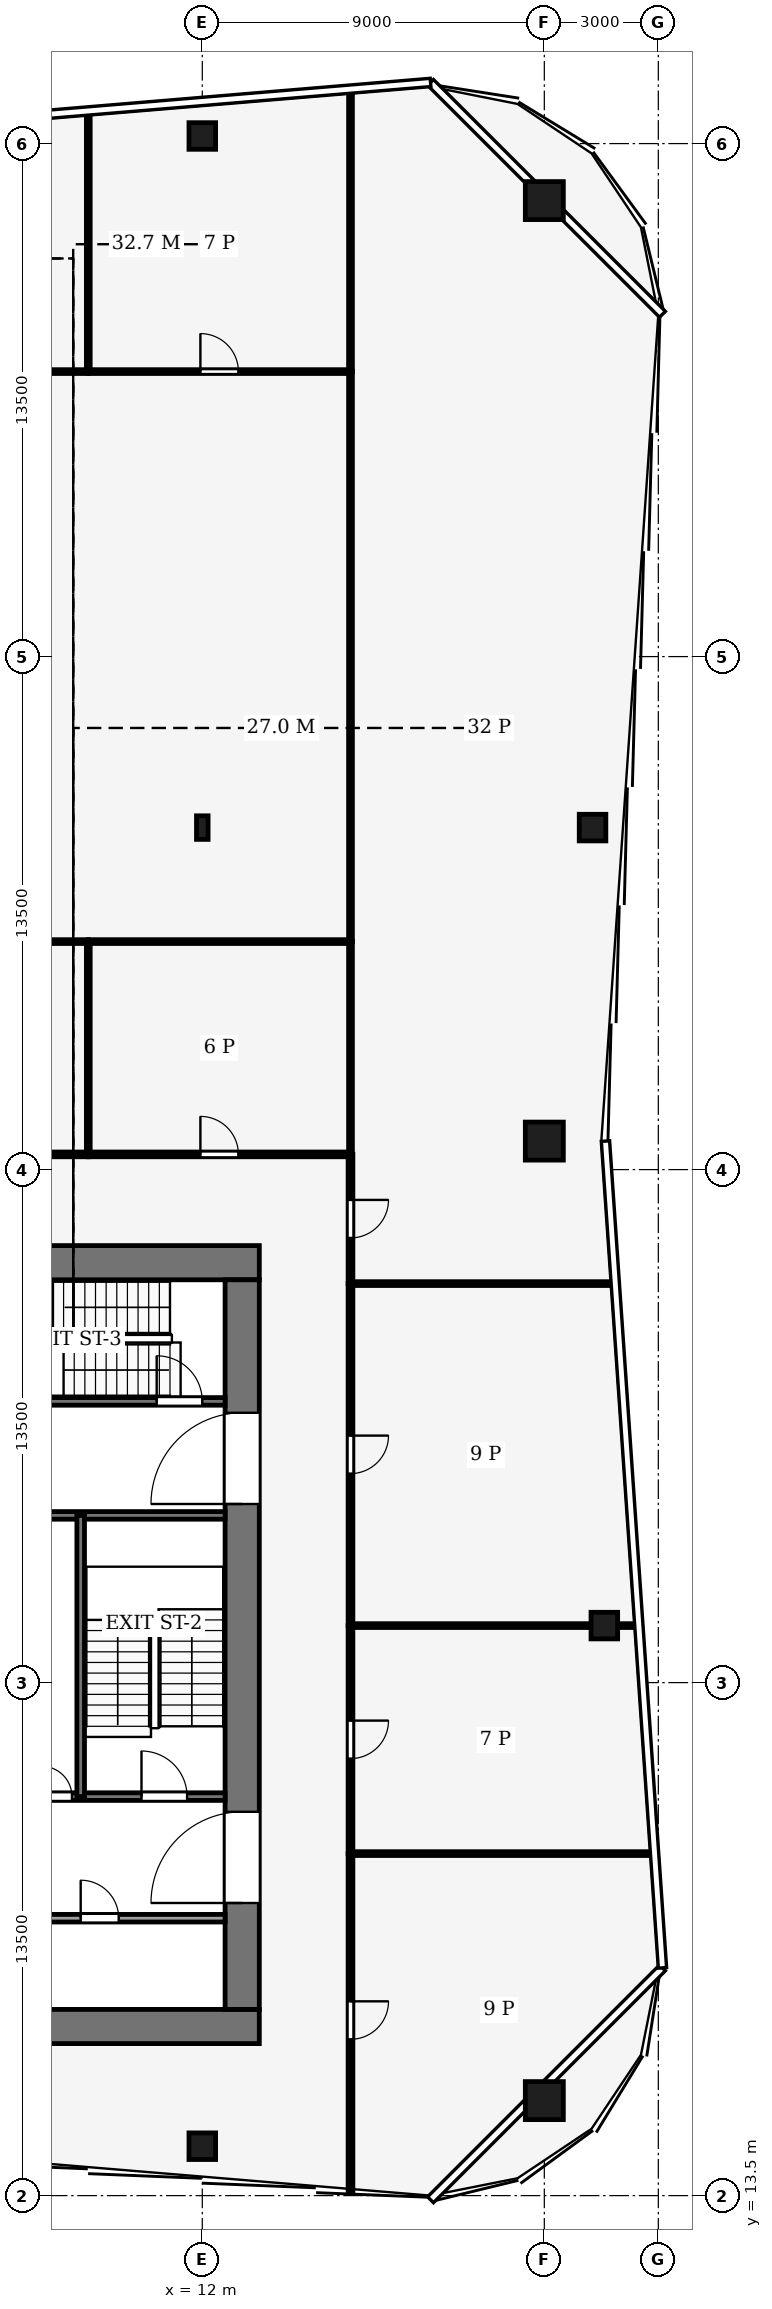
"""IFC4 building model, lengths in metres.
Left out: names, types, materials, properties, quantities, classifications, styles, units other than length and angle.
Written with IfcOpenShell. Run it as: python <this file> out.ifc"""

import sys

from ifc_helpers import new_model, si_unit, direction, frame, frame_2d, origin, origin_2d, place, context, subcontext, project, spatial, rectangle, hollow_rectangle, i_section, extrude, element, fill, save


model = new_model("IFC4")
c1 = context("Model", 3, precision=1e-05, world=origin(), true_north=direction((0.0, 1.0)))
c2 = subcontext(c1, "Body", "Model", "MODEL_VIEW")
j1 = project(units=[si_unit("LENGTHUNIT", "METRE"), si_unit("PLANEANGLEUNIT", "RADIAN")], contexts=[c1])
p1 = place(None, origin())
s1 = spatial("IfcSite", under=j1, at=p1, CompositionType="ELEMENT")
p2 = place(p1, origin())
s2 = spatial("IfcBuilding", under=s1, at=p2, CompositionType="ELEMENT")
p3 = place(p2, frame((0.0, 0.0, 202.0)))
s3 = spatial("IfcBuildingStorey", under=s2, at=p3, CompositionType="ELEMENT", Elevation=202.0)
for number, where, z_axis, x_axis in (
    (1, (-13.5, 17.95, -0.13), (0.0, 0.0, 1.0), (1.0, 0.0, 0.0)),
    (2, (-13.5, 38.05, -0.13), (0.0, 0.0, 1.0), (1.0, 0.0, 0.0)),
):
    element("IfcWall", number, at=place(p3, frame(where, z_axis=z_axis, x_axis=x_axis)), inside=s3, PredefinedType="SHEAR", context=c2, shape_type="SweptSolid", body=[
        extrude(rectangle(XDim=27.0, YDim=0.9, at=frame_2d((13.5, 0.0))), origin(), (0.0, 0.0, 1.0), 4.0),
    ])
p4 = place(p3, frame((13.05, 18.4, -0.13), z_axis=(0.0, 0.0, 1.0), x_axis=(0.0, 1.0, 0.0)))
e3 = element("IfcWall", 3, at=p4, inside=s3, PredefinedType="SHEAR", context=c2, shape_type="SweptSolid", body=[
    extrude(rectangle(XDim=19.2, YDim=0.9, at=frame_2d((9.6, 0.0))), origin(), (0.0, 0.0, 1.0), 4.0),
])
p5 = place(p4, frame((2.8, 0.0, 0.13)))
e4 = element("IfcOpeningElement", 4, at=p5, cuts=e3, PredefinedType="OPENING", context=c2, shape_type="SweptSolid", body=[
    extrude(rectangle(XDim=2.4, YDim=2.4, at=frame_2d((1.2, 1.2))), frame((0.0, 0.46, 0.0), z_axis=(0.0, -1.0, 0.0), x_axis=(1.0, 0.0, 0.0)), (0.0, 0.0, 1.0), 0.92),
])
p6 = place(p4, frame((13.3, 0.0, 0.13)))
e5 = element("IfcOpeningElement", 5, at=p6, cuts=e3, PredefinedType="OPENING", context=c2, shape_type="SweptSolid", body=[
    extrude(rectangle(XDim=2.4, YDim=2.4, at=frame_2d((1.2, 1.2))), frame((0.0, 0.46, 0.0), z_axis=(0.0, -1.0, 0.0), x_axis=(1.0, 0.0, 0.0)), (0.0, 0.0, 1.0), 0.92),
])
for number, where, z_axis, x_axis in (
    (6, (21.0, 66.0, 0.0), (0.0, 0.0, 1.0), (1.0, 0.0, 0.0)),
    (7, (21.0, 41.25, 0.0), (0.0, 0.0, 1.0), (1.0, 0.0, 0.0)),
    (8, (21.0, 16.0, 0.0), (0.0, 0.0, 1.0), (1.0, 0.0, 0.0)),
):
    element("IfcColumn", number, at=place(p3, frame(where, z_axis=z_axis, x_axis=x_axis)), inside=s3, PredefinedType="COLUMN", context=c2, shape_type="SweptSolid", body=[
        extrude(hollow_rectangle(XDim=1.0, YDim=1.0, WallThickness=0.06, at=origin_2d()), origin(), (0.0, 0.0, 1.0), 4.0),
    ])
for number, where, z_axis, x_axis in (
    (9, (12.0, 67.7, 0.0), (0.0, 0.0, 1.0), (1.0, 0.0, 0.0)),
    (10, (12.0, 14.8, 0.0), (0.0, 0.0, 1.0), (1.0, 0.0, 0.0)),
    (11, (22.579, 28.5, 0.0), (0.0, 0.0, 1.0), (1.0, 0.0, 0.0)),
    (12, (22.269, 49.5, 0.0), (0.0, 0.0, 1.0), (1.0, 0.0, 0.0)),
):
    element("IfcColumn", number, at=place(p3, frame(where, z_axis=z_axis, x_axis=x_axis)), inside=s3, PredefinedType="COLUMN", context=c2, shape_type="SweptSolid", body=[
        extrude(hollow_rectangle(XDim=0.7, YDim=0.7, WallThickness=0.03, at=origin_2d()), origin(), (0.0, 0.0, 1.0), 4.0),
    ])
p7 = place(p3, frame((12.0, 49.5, 0.0), z_axis=(0.0, 0.0, 1.0), x_axis=(1.0, 0.0, 0.0)))
e13 = element("IfcColumn", 13, at=p7, inside=s3, PredefinedType="COLUMN", context=c2, shape_type="SweptSolid", body=[
    extrude(i_section(OverallWidth=0.305, OverallDepth=0.62, WebThickness=0.021, FlangeThickness=0.04, FilletRadius=0.027, at=origin_2d()), origin(), (0.0, 0.0, 1.0), 4.0),
])
p8 = place(p3, frame((6.0, 20.8, 0.0), z_axis=(0.0, 0.0, 1.0), x_axis=(1.0, 0.0, 0.0)))
e14 = element("IfcWall", 14, at=p8, inside=s3, PredefinedType="PARTITIONING", context=c2, shape_type="SweptSolid", body=[
    extrude(rectangle(XDim=6.6, YDim=0.2, at=frame_2d((3.3, 0.0))), origin(), (0.0, 0.0, 1.0), 3.87),
])
p9 = place(p8, frame((2.8, 0.0, 0.0)))
e15 = element("IfcOpeningElement", 15, at=p9, cuts=e14, PredefinedType="OPENING", context=c2, shape_type="SweptSolid", body=[
    extrude(rectangle(XDim=1.0, YDim=2.1, at=frame_2d((0.5, 1.05))), frame((0.0, 0.11, 0.0), z_axis=(0.0, -1.0, 0.0), x_axis=(1.0, 0.0, 0.0)), (0.0, 0.0, 1.0), 0.22),
])
p10 = place(p3, frame((6.0, 24.0, 0.0), z_axis=(0.0, 0.0, 1.0), x_axis=(1.0, 0.0, 0.0)))
e16 = element("IfcWall", 16, at=p10, inside=s3, PredefinedType="PARTITIONING", context=c2, shape_type="SweptSolid", body=[
    extrude(rectangle(XDim=6.6, YDim=0.2, at=frame_2d((3.3, 0.0))), origin(), (0.0, 0.0, 1.0), 3.87),
])
p11 = place(p10, frame((0.27, 0.0, 0.0)))
e17 = element("IfcOpeningElement", 17, at=p11, cuts=e16, PredefinedType="OPENING", context=c2, shape_type="SweptSolid", body=[
    extrude(rectangle(XDim=1.0, YDim=2.1, at=frame_2d((0.5, 1.05))), frame((0.0, 0.11, 0.0), z_axis=(0.0, -1.0, 0.0), x_axis=(1.0, 0.0, 0.0)), (0.0, 0.0, 1.0), 0.22),
])
p12 = place(p10, frame((1.77, 0.0, 0.0)))
e18 = element("IfcOpeningElement", 18, at=p12, cuts=e16, PredefinedType="OPENING", context=c2, shape_type="SweptSolid", body=[
    extrude(rectangle(XDim=0.8, YDim=2.1, at=frame_2d((0.4, 1.05))), frame((0.0, 0.11, 0.0), z_axis=(0.0, -1.0, 0.0), x_axis=(1.0, 0.0, 0.0)), (0.0, 0.0, 1.0), 0.22),
])
p13 = place(p10, frame((4.4, 0.0, 0.0)))
e19 = element("IfcOpeningElement", 19, at=p13, cuts=e16, PredefinedType="OPENING", context=c2, shape_type="SweptSolid", body=[
    extrude(rectangle(XDim=1.2, YDim=2.2, at=frame_2d((0.6, 1.1))), frame((0.0, 0.11, 0.0), z_axis=(0.0, -1.0, 0.0), x_axis=(1.0, 0.0, 0.0)), (0.0, 0.0, 1.0), 0.22),
])
p14 = place(p3, frame((6.0, 31.4, 0.0), z_axis=(0.0, 0.0, 1.0), x_axis=(1.0, 0.0, 0.0)))
e20 = element("IfcWall", 20, at=p14, inside=s3, PredefinedType="PARTITIONING", context=c2, shape_type="SweptSolid", body=[
    extrude(rectangle(XDim=6.6, YDim=0.2, at=frame_2d((3.3, 0.0))), origin(), (0.0, 0.0, 1.0), 3.87),
])
p15 = place(p3, frame((6.0, 34.4, 0.0), z_axis=(0.0, 0.0, 1.0), x_axis=(1.0, 0.0, 0.0)))
e21 = element("IfcWall", 21, at=p15, inside=s3, PredefinedType="PARTITIONING", context=c2, shape_type="SweptSolid", body=[
    extrude(rectangle(XDim=6.6, YDim=0.2, at=frame_2d((3.3, 0.0))), origin(), (0.0, 0.0, 1.0), 3.87),
])
p16 = place(p15, frame((4.8, 0.0, 0.0)))
e22 = element("IfcOpeningElement", 22, at=p16, cuts=e21, PredefinedType="OPENING", context=c2, shape_type="SweptSolid", body=[
    extrude(rectangle(XDim=1.2, YDim=2.2, at=frame_2d((0.6, 1.1))), frame((0.0, 0.11, 0.0), z_axis=(0.0, -1.0, 0.0), x_axis=(1.0, 0.0, 0.0)), (0.0, 0.0, 1.0), 0.22),
])
p17 = place(p3, frame((8.8, 24.0, 0.0), z_axis=(0.0, 0.0, 1.0), x_axis=(0.0, 1.0, 0.0)))
e23 = element("IfcWall", 23, at=p17, inside=s3, PredefinedType="PARTITIONING", context=c2, shape_type="SweptSolid", body=[
    extrude(rectangle(XDim=7.4, YDim=0.2, at=frame_2d((3.7, 0.0))), origin(), (0.0, 0.0, 1.0), 3.87),
])
p18 = place(p3, frame((3.0, 40.9, 0.0), z_axis=(0.0, 0.0, 1.0), x_axis=(1.0, 0.0, 0.0)))
e24 = element("IfcWall", 24, at=p18, inside=s3, PredefinedType="PARTITIONING", context=c2, shape_type="SweptSolid", body=[
    extrude(rectangle(XDim=6.0, YDim=0.125, at=frame_2d((3.0, 0.0))), origin(), (0.0, 0.0, 1.0), 3.44),
])
p19 = place(p18, frame((2.5, 0.0, 0.0)))
e25 = element("IfcOpeningElement", 25, at=p19, cuts=e24, PredefinedType="OPENING", context=c2, shape_type="SweptSolid", body=[
    extrude(rectangle(XDim=1.0, YDim=2.1, at=frame_2d((0.5, 1.05))), frame((0.0, 0.073, 0.0), z_axis=(0.0, -1.0, 0.0), x_axis=(1.0, 0.0, 0.0)), (0.0, 0.0, 1.0), 0.145),
])
p20 = place(p3, frame((9.0, 40.9, 0.0), z_axis=(0.0, 0.0, 1.0), x_axis=(1.0, 0.0, 0.0)))
e26 = element("IfcWall", 26, at=p20, inside=s3, PredefinedType="PARTITIONING", context=c2, shape_type="SweptSolid", body=[
    extrude(rectangle(XDim=6.9, YDim=0.125, at=frame_2d((3.45, 0.0))), origin(), (0.0, 0.0, 1.0), 3.44),
])
p21 = place(p20, frame((2.95, 0.0, 0.0)))
e27 = element("IfcOpeningElement", 27, at=p21, cuts=e26, PredefinedType="OPENING", context=c2, shape_type="SweptSolid", body=[
    extrude(rectangle(XDim=1.0, YDim=2.1, at=frame_2d((0.5, 1.05))), frame((0.0, 0.073, 0.0), z_axis=(0.0, -1.0, 0.0), x_axis=(1.0, 0.0, 0.0)), (0.0, 0.0, 1.0), 0.145),
])
p22 = place(p3, frame((15.9, 22.5, 0.0), z_axis=(0.0, 0.0, 1.0), x_axis=(0.0, -1.0, 0.0)))
e28 = element("IfcWall", 28, at=p22, inside=s3, PredefinedType="PARTITIONING", context=c2, shape_type="SweptSolid", body=[
    extrude(rectangle(XDim=8.905, YDim=0.125, at=frame_2d((4.453, 0.0))), origin(), (0.0, 0.0, 1.0), 3.04),
])
p23 = place(p22, frame((3.887, 0.0, 0.0)))
e29 = element("IfcOpeningElement", 29, at=p23, cuts=e28, PredefinedType="OPENING", context=c2, shape_type="SweptSolid", body=[
    extrude(rectangle(XDim=1.0, YDim=2.1, at=frame_2d((0.5, 1.05))), frame((0.0, 0.073, 0.0), z_axis=(0.0, -1.0, 0.0), x_axis=(1.0, 0.0, 0.0)), (0.0, 0.0, 1.0), 0.145),
])
p24 = place(p3, frame((15.9, 28.5, 0.0), z_axis=(0.0, 0.0, 1.0), x_axis=(0.0, -1.0, 0.0)))
e30 = element("IfcWall", 30, at=p24, inside=s3, PredefinedType="PARTITIONING", context=c2, shape_type="SweptSolid", body=[
    extrude(rectangle(XDim=6.0, YDim=0.125, at=frame_2d((3.0, 0.0))), origin(), (0.0, 0.0, 1.0), 3.44),
])
p25 = place(p24, frame((2.5, 0.0, 0.0)))
e31 = element("IfcOpeningElement", 31, at=p25, cuts=e30, PredefinedType="OPENING", context=c2, shape_type="SweptSolid", body=[
    extrude(rectangle(XDim=1.0, YDim=2.1, at=frame_2d((0.5, 1.05))), frame((0.0, 0.073, 0.0), z_axis=(0.0, -1.0, 0.0), x_axis=(1.0, 0.0, 0.0)), (0.0, 0.0, 1.0), 0.145),
])
p26 = place(p3, frame((15.9, 37.5, 0.0), z_axis=(0.0, 0.0, 1.0), x_axis=(0.0, -1.0, 0.0)))
e32 = element("IfcWall", 32, at=p26, inside=s3, PredefinedType="PARTITIONING", context=c2, shape_type="SweptSolid", body=[
    extrude(rectangle(XDim=9.0, YDim=0.125, at=frame_2d((4.5, 0.0))), origin(), (0.0, 0.0, 1.0), 3.48),
])
p27 = place(p26, frame((4.0, 0.0, 0.0)))
e33 = element("IfcOpeningElement", 33, at=p27, cuts=e32, PredefinedType="OPENING", context=c2, shape_type="SweptSolid", body=[
    extrude(rectangle(XDim=1.0, YDim=2.1, at=frame_2d((0.5, 1.05))), frame((0.0, 0.073, 0.0), z_axis=(0.0, -1.0, 0.0), x_axis=(1.0, 0.0, 0.0)), (0.0, 0.0, 1.0), 0.145),
])
p28 = place(p3, frame((15.9, 40.904, 0.0), z_axis=(0.0, 0.0, 1.0), x_axis=(0.0, -1.0, 0.0)))
e34 = element("IfcWall", 34, at=p28, inside=s3, PredefinedType="PARTITIONING", context=c2, shape_type="SweptSolid", body=[
    extrude(rectangle(XDim=3.404, YDim=0.125, at=frame_2d((1.702, 0.0))), origin(), (0.0, 0.0, 1.0), 3.14),
])
p29 = place(p28, frame((1.202, 0.0, 0.0)))
e35 = element("IfcOpeningElement", 35, at=p29, cuts=e34, PredefinedType="OPENING", context=c2, shape_type="SweptSolid", body=[
    extrude(rectangle(XDim=1.0, YDim=2.1, at=frame_2d((0.5, 1.05))), frame((0.0, 0.073, 0.0), z_axis=(0.0, -1.0, 0.0), x_axis=(1.0, 0.0, 0.0)), (0.0, 0.0, 1.0), 0.145),
])
p30 = place(p3, frame((9.0, 40.9, 0.0), z_axis=(0.0, 0.0, 1.0), x_axis=(0.0, 1.0, 0.0)))
e36 = element("IfcWall", 36, at=p30, inside=s3, PredefinedType="PARTITIONING", context=c2, shape_type="SweptSolid", body=[
    extrude(rectangle(XDim=5.6, YDim=0.1, at=frame_2d((2.8, 0.0))), origin(), (0.0, 0.0, 1.0), 3.87),
])
p31 = place(p3, frame((9.004, 46.5, 0.0), z_axis=(0.0, 0.0, 1.0), x_axis=(-1.0, 0.0, 0.0)))
e37 = element("IfcWall", 37, at=p31, inside=s3, PredefinedType="PARTITIONING", context=c2, shape_type="SweptSolid", body=[
    extrude(rectangle(XDim=6.008, YDim=0.1, at=frame_2d((3.004, 0.0))), origin(), (0.0, 0.0, 1.0), 3.44),
])
p32 = place(p3, frame((15.9, 46.5, 0.0), z_axis=(0.0, 0.0, 1.0), x_axis=(-1.0, 0.0, 0.0)))
e38 = element("IfcWall", 38, at=p32, inside=s3, PredefinedType="PARTITIONING", context=c2, shape_type="SweptSolid", body=[
    extrude(rectangle(XDim=6.904, YDim=0.1, at=frame_2d((3.452, 0.0))), origin(), (0.0, 0.0, 1.0), 3.44),
])
p33 = place(p3, frame((15.9, 40.896, 0.0), z_axis=(0.0, 0.0, 1.0), x_axis=(0.0, 1.0, 0.0)))
e39 = element("IfcWall", 39, at=p33, inside=s3, PredefinedType="PARTITIONING", context=c2, shape_type="SweptSolid", body=[
    extrude(rectangle(XDim=5.608, YDim=0.1, at=frame_2d((2.804, 0.0))), origin(), (0.0, 0.0, 1.0), 3.44),
])
p34 = place(p3, frame((0.0, 61.5, 0.0), z_axis=(0.0, 0.0, 1.0), x_axis=(1.0, 0.0, 0.0)))
e40 = element("IfcWall", 40, at=p34, inside=s3, PredefinedType="PARTITIONING", context=c2, shape_type="SweptSolid", body=[
    extrude(rectangle(XDim=9.0, YDim=0.1, at=frame_2d((4.5, 0.0))), origin(), (0.0, 0.0, 1.0), 3.24),
])
p35 = place(p34, frame((4.0, 0.0, 0.0)))
e41 = element("IfcOpeningElement", 41, at=p35, cuts=e40, PredefinedType="OPENING", context=c2, shape_type="SweptSolid", body=[
    extrude(rectangle(XDim=1.0, YDim=2.1, at=frame_2d((0.5, 1.05))), frame((0.0, 0.06, 0.0), z_axis=(0.0, -1.0, 0.0), x_axis=(1.0, 0.0, 0.0)), (0.0, 0.0, 1.0), 0.12),
])
p36 = place(p3, frame((9.0, 61.5, 0.0), z_axis=(0.0, 0.0, 1.0), x_axis=(1.0, 0.0, 0.0)))
e42 = element("IfcWall", 42, at=p36, inside=s3, PredefinedType="PARTITIONING", context=c2, shape_type="SweptSolid", body=[
    extrude(rectangle(XDim=6.9, YDim=0.1, at=frame_2d((3.45, 0.0))), origin(), (0.0, 0.0, 1.0), 3.24),
])
p37 = place(p36, frame((2.95, 0.0, 0.0)))
e43 = element("IfcOpeningElement", 43, at=p37, cuts=e42, PredefinedType="OPENING", context=c2, shape_type="SweptSolid", body=[
    extrude(rectangle(XDim=1.0, YDim=2.1, at=frame_2d((0.5, 1.05))), frame((0.0, 0.06, 0.0), z_axis=(0.0, -1.0, 0.0), x_axis=(1.0, 0.0, 0.0)), (0.0, 0.0, 1.0), 0.12),
])
p38 = place(p3, frame((15.9, 46.496, 0.0), z_axis=(0.0, 0.0, 1.0), x_axis=(0.0, 1.0, 0.0)))
e44 = element("IfcWall", 44, at=p38, inside=s3, PredefinedType="PARTITIONING", context=c2, shape_type="SweptSolid", body=[
    extrude(rectangle(XDim=15.008, YDim=0.1, at=frame_2d((7.504, 0.0))), origin(), (0.0, 0.0, 1.0), 3.24),
])
p39 = place(p3, frame((9.0, 61.5, 0.0), z_axis=(0.0, 0.0, 1.0), x_axis=(0.0, 1.0, 0.0)))
e45 = element("IfcWall", 45, at=p39, inside=s3, PredefinedType="PARTITIONING", context=c2, shape_type="SweptSolid", body=[
    extrude(rectangle(XDim=6.83, YDim=0.1, at=frame_2d((3.415, 0.0))), origin(), (0.0, 0.0, 1.0), 3.04),
])
p40 = place(p3, frame((15.9, 61.496, 0.0), z_axis=(0.0, 0.0, 1.0), x_axis=(0.0, 1.0, 0.0)))
e46 = element("IfcWall", 46, at=p40, inside=s3, PredefinedType="PARTITIONING", context=c2, shape_type="SweptSolid", body=[
    extrude(rectangle(XDim=7.409, YDim=0.1, at=frame_2d((3.705, 0.0))), origin(), (0.0, 0.0, 1.0), 3.04),
])
p41 = place(p3, frame((23.873, 22.5, 0.0), z_axis=(0.0, 0.0, 1.0), x_axis=(-1.0, 0.0, 0.0)))
e47 = element("IfcWall", 47, at=p41, inside=s3, PredefinedType="PARTITIONING", context=c2, shape_type="SweptSolid", body=[
    extrude(rectangle(XDim=7.973, YDim=0.1, at=frame_2d((3.987, 0.0))), origin(), (0.0, 0.0, 1.0), 3.04),
])
p42 = place(p3, frame((23.459, 28.5, 0.0), z_axis=(0.0, 0.0, 1.0), x_axis=(-1.0, 0.0, 0.0)))
e48 = element("IfcWall", 48, at=p42, inside=s3, PredefinedType="PARTITIONING", context=c2, shape_type="SweptSolid", body=[
    extrude(rectangle(XDim=7.559, YDim=0.1, at=frame_2d((3.78, 0.0))), origin(), (0.0, 0.0, 1.0), 3.04),
])
p43 = place(p3, frame((22.839, 37.5, 0.0), z_axis=(0.0, 0.0, 1.0), x_axis=(-1.0, 0.0, 0.0)))
e49 = element("IfcWall", 49, at=p43, inside=s3, PredefinedType="PARTITIONING", context=c2, shape_type="SweptSolid", body=[
    extrude(rectangle(XDim=6.939, YDim=0.1, at=frame_2d((3.469, 0.0))), origin(), (0.0, 0.0, 1.0), 3.04),
])
p44 = place(p9, origin())
e50 = element("IfcDoor", 50, at=p44, inside=s3, OperationType="SINGLE_SWING_RIGHT", PredefinedType="DOOR", context=c2, shape_type="SweptSolid", body=[
    extrude(rectangle(XDim=1.0, YDim=2.1, at=frame_2d((0.5, 1.05))), frame((0.0, 0.025, 0.0), z_axis=(0.0, -1.0, 0.0), x_axis=(1.0, 0.0, 0.0)), (0.0, 0.0, 1.0), 0.05),
])
fill(e15, e50)
p45 = place(p12, origin())
e51 = element("IfcDoor", 51, at=p45, inside=s3, OperationType="SINGLE_SWING_LEFT", PredefinedType="DOOR", context=c2, shape_type="SweptSolid", body=[
    extrude(rectangle(XDim=0.8, YDim=2.1, at=frame_2d((0.4, 1.05))), frame((0.0, 0.025, 0.0), z_axis=(0.0, -1.0, 0.0), x_axis=(1.0, 0.0, 0.0)), (0.0, 0.0, 1.0), 0.05),
])
fill(e18, e51)
p46 = place(p13, origin())
e52 = element("IfcDoor", 52, at=p46, inside=s3, OperationType="SINGLE_SWING_RIGHT", PredefinedType="DOOR", context=c2, shape_type="SweptSolid", body=[
    extrude(rectangle(XDim=1.2, YDim=2.2, at=frame_2d((0.6, 1.1))), frame((0.0, 0.025, 0.0), z_axis=(0.0, -1.0, 0.0), x_axis=(1.0, 0.0, 0.0)), (0.0, 0.0, 1.0), 0.05),
])
fill(e19, e52)
p47 = place(p16, origin())
e53 = element("IfcDoor", 53, at=p47, inside=s3, OperationType="SINGLE_SWING_LEFT", PredefinedType="DOOR", context=c2, shape_type="SweptSolid", body=[
    extrude(rectangle(XDim=1.2, YDim=2.2, at=frame_2d((0.6, 1.1))), frame((0.0, 0.025, 0.0), z_axis=(0.0, -1.0, 0.0), x_axis=(1.0, 0.0, 0.0)), (0.0, 0.0, 1.0), 0.05),
])
fill(e22, e53)
p48 = place(p5, origin())
e54 = element("IfcDoor", 54, at=p48, inside=s3, OperationType="DOUBLE_DOOR_SINGLE_SWING", PredefinedType="DOOR", context=c2, shape_type="SweptSolid", body=[
    extrude(rectangle(XDim=2.4, YDim=2.4, at=frame_2d((1.2, 1.2))), frame((0.0, 0.025, 0.0), z_axis=(0.0, -1.0, 0.0), x_axis=(1.0, 0.0, 0.0)), (0.0, 0.0, 1.0), 0.05),
])
fill(e4, e54)
p49 = place(p6, origin())
e55 = element("IfcDoor", 55, at=p49, inside=s3, OperationType="DOUBLE_DOOR_SINGLE_SWING", PredefinedType="DOOR", context=c2, shape_type="SweptSolid", body=[
    extrude(rectangle(XDim=2.4, YDim=2.4, at=frame_2d((1.2, 1.2))), frame((0.0, 0.025, 0.0), z_axis=(0.0, -1.0, 0.0), x_axis=(1.0, 0.0, 0.0)), (0.0, 0.0, 1.0), 0.05),
])
fill(e5, e55)
p50 = place(p21, origin())
e56 = element("IfcDoor", 56, at=p50, inside=s3, OperationType="SINGLE_SWING_RIGHT", PredefinedType="DOOR", context=c2, shape_type="SweptSolid", body=[
    extrude(rectangle(XDim=1.0, YDim=2.1, at=frame_2d((0.5, 1.05))), frame((0.0, 0.025, 0.0), z_axis=(0.0, -1.0, 0.0), x_axis=(1.0, 0.0, 0.0)), (0.0, 0.0, 1.0), 0.05),
])
fill(e27, e56)
p51 = place(p23, origin())
e57 = element("IfcDoor", 57, at=p51, inside=s3, OperationType="SINGLE_SWING_LEFT", PredefinedType="DOOR", context=c2, shape_type="SweptSolid", body=[
    extrude(rectangle(XDim=1.0, YDim=2.1, at=frame_2d((0.5, 1.05))), frame((0.0, 0.025, 0.0), z_axis=(0.0, -1.0, 0.0), x_axis=(1.0, 0.0, 0.0)), (0.0, 0.0, 1.0), 0.05),
])
fill(e29, e57)
p52 = place(p25, origin())
e58 = element("IfcDoor", 58, at=p52, inside=s3, OperationType="SINGLE_SWING_LEFT", PredefinedType="DOOR", context=c2, shape_type="SweptSolid", body=[
    extrude(rectangle(XDim=1.0, YDim=2.1, at=frame_2d((0.5, 1.05))), frame((0.0, 0.025, 0.0), z_axis=(0.0, -1.0, 0.0), x_axis=(1.0, 0.0, 0.0)), (0.0, 0.0, 1.0), 0.05),
])
fill(e31, e58)
p53 = place(p27, origin())
e59 = element("IfcDoor", 59, at=p53, inside=s3, OperationType="SINGLE_SWING_RIGHT", PredefinedType="DOOR", context=c2, shape_type="SweptSolid", body=[
    extrude(rectangle(XDim=1.0, YDim=2.1, at=frame_2d((0.5, 1.05))), frame((0.0, 0.025, 0.0), z_axis=(0.0, -1.0, 0.0), x_axis=(1.0, 0.0, 0.0)), (0.0, 0.0, 1.0), 0.05),
])
fill(e33, e59)
p54 = place(p29, origin())
e60 = element("IfcDoor", 60, at=p54, inside=s3, OperationType="SINGLE_SWING_LEFT", PredefinedType="DOOR", context=c2, shape_type="SweptSolid", body=[
    extrude(rectangle(XDim=1.0, YDim=2.1, at=frame_2d((0.5, 1.05))), frame((0.0, 0.025, 0.0), z_axis=(0.0, -1.0, 0.0), x_axis=(1.0, 0.0, 0.0)), (0.0, 0.0, 1.0), 0.05),
])
fill(e35, e60)
p55 = place(p37, origin())
e61 = element("IfcDoor", 61, at=p55, inside=s3, OperationType="SINGLE_SWING_RIGHT", PredefinedType="DOOR", context=c2, shape_type="SweptSolid", body=[
    extrude(rectangle(XDim=1.0, YDim=2.1, at=frame_2d((0.5, 1.05))), frame((0.0, 0.025, 0.0), z_axis=(0.0, -1.0, 0.0), x_axis=(1.0, 0.0, 0.0)), (0.0, 0.0, 1.0), 0.05),
])
fill(e43, e61)
save(model, sys.argv[1])
